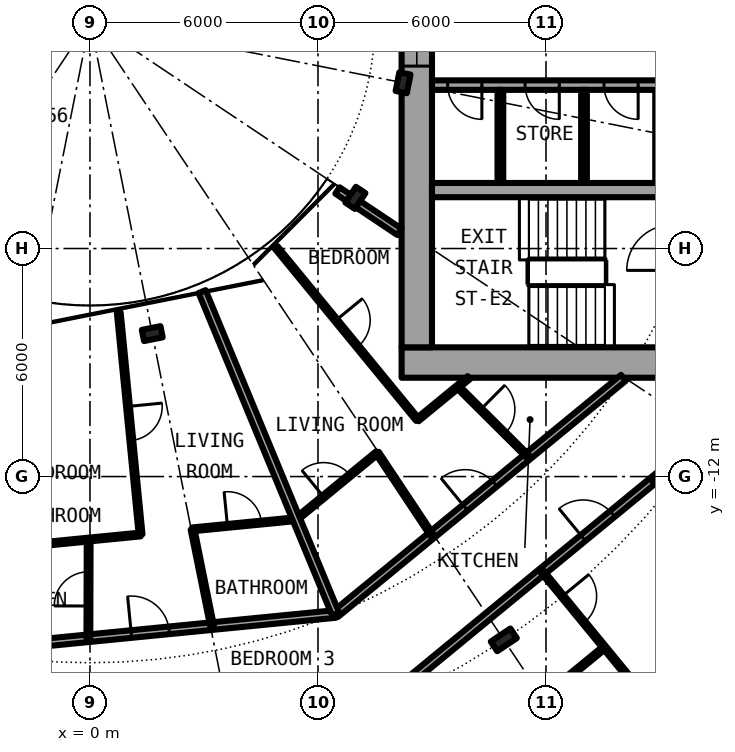
"""IFC4 building model, lengths in metres.
Left out: names, types, materials, properties, quantities, classifications, styles, units other than length and angle.
Written with IfcOpenShell. Run it as: python <this file> out.ifc"""

import sys

from ifc_helpers import new_model, si_unit, direction, frame, frame_2d, origin, origin_2d, place, context, subcontext, project, spatial, rectangle, i_section, extrude, element, fill, save


model = new_model("IFC4")
c1 = context("Model", 3, precision=1e-05, world=origin(), true_north=direction((0.0, 1.0)))
c2 = subcontext(c1, "Body", "Model", "MODEL_VIEW")
j1 = project(units=[si_unit("LENGTHUNIT", "METRE"), si_unit("PLANEANGLEUNIT", "RADIAN")], contexts=[c1])
p1 = place(None, origin())
s1 = spatial("IfcSite", under=j1, at=p1, CompositionType="ELEMENT")
p2 = place(p1, origin())
s2 = spatial("IfcBuilding", under=s1, at=p2, CompositionType="ELEMENT")
p3 = place(p2, frame((0.0, 0.0, 35.0)))
s3 = spatial("IfcBuildingStorey", under=s2, at=p3, CompositionType="ELEMENT", Elevation=35.0)
p4 = place(p3, frame((10.889, -16.297, 0.0), z_axis=(0.0, 0.0, 1.0), x_axis=(0.55557023302, -0.831469612303, 0.0)))
e1 = element("IfcColumn", 1, at=p4, inside=s3, PredefinedType="COLUMN", context=c2, shape_type="SweptSolid", body=[
    extrude(i_section(OverallWidth=0.305, OverallDepth=0.62, WebThickness=0.021, FlangeThickness=0.04, FilletRadius=0.027, at=origin_2d()), origin(), (0.0, 0.0, 1.0), 3.05),
])
for number, where, z_axis, x_axis in (
    (2, (1.639, -8.239, 0.0), (0.0, 0.0, 1.0), (0.195, -0.981, 0.0)),
    (3, (6.984, -4.667, 0.0), (0.0, 0.0, 1.0), (0.831, -0.556, 0.0)),
    (4, (8.239, -1.639, 0.0), (0.0, 0.0, 1.0), (0.981, -0.195, 0.0)),
):
    element("IfcColumn", number, at=place(p3, frame(where, z_axis=z_axis, x_axis=x_axis)), inside=s3, PredefinedType="COLUMN", context=c2, shape_type="SweptSolid", body=[
        extrude(i_section(OverallWidth=0.3, OverallDepth=0.5, WebThickness=0.014, FlangeThickness=0.028, FilletRadius=0.027, at=origin_2d()), origin(), (0.0, 0.0, 1.0), 3.05),
    ])
p5 = place(p3, frame((8.2, -9.0, 0.0), z_axis=(0.0, 0.0, 1.0), x_axis=(1.0, 0.0, 0.0)))
e5 = element("IfcWall", 5, at=p5, inside=s3, PredefinedType="SHEAR", context=c2, shape_type="SweptSolid", body=[
    extrude(rectangle(XDim=14.2, YDim=0.8, at=frame_2d((7.1, 0.0))), origin(), (0.0, 0.0, 1.0), 3.05),
])
p6 = place(p5, frame((11.675, 0.0, 0.0)))
e6 = element("IfcOpeningElement", 6, at=p6, cuts=e5, PredefinedType="OPENING", context=c2, shape_type="SweptSolid", body=[
    extrude(rectangle(XDim=1.2, YDim=2.3, at=frame_2d((0.6, 1.15))), frame((0.0, 0.41, 0.0), z_axis=(0.0, -1.0, 0.0), x_axis=(1.0, 0.0, 0.0)), (0.0, 0.0, 1.0), 0.82),
])
p7 = place(p3, frame((8.6, -8.6, 0.0), z_axis=(0.0, 0.0, 1.0), x_axis=(0.0, 1.0, 0.0)))
e7 = element("IfcWall", 7, at=p7, inside=s3, PredefinedType="SHEAR", context=c2, shape_type="SweptSolid", body=[
    extrude(rectangle(XDim=17.2, YDim=0.8, at=frame_2d((8.6, 0.0))), origin(), (0.0, 0.0, 1.0), 3.05),
])
p8 = place(p7, frame((7.4, 0.0, 0.1)))
e8 = element("IfcOpeningElement", 8, at=p8, cuts=e7, PredefinedType="OPENING", context=c2, shape_type="SweptSolid", body=[
    extrude(rectangle(XDim=2.4, YDim=2.2, at=frame_2d((1.2, 1.1))), frame((0.0, 0.41, 0.0), z_axis=(0.0, -1.0, 0.0), x_axis=(1.0, 0.0, 0.0)), (0.0, 0.0, 1.0), 0.82),
])
p9 = place(p3, frame((19.15, -1.7, 0.0), z_axis=(0.0, 0.0, 1.0), x_axis=(-1.0, 0.0, 0.0)))
e9 = element("IfcWall", 9, at=p9, inside=s3, PredefinedType="SHEAR", context=c2, shape_type="SweptSolid", body=[
    extrude(rectangle(XDim=10.15, YDim=0.25, at=frame_2d((5.075, 0.0))), origin(), (0.0, 0.0, 1.0), 3.05),
])
p10 = place(p9, frame((2.45, 0.0, 0.0)))
e10 = element("IfcOpeningElement", 10, at=p10, cuts=e9, PredefinedType="OPENING", context=c2, shape_type="SweptSolid", body=[
    extrude(rectangle(XDim=1.1, YDim=2.3, at=frame_2d((0.55, 1.15))), frame((0.0, 0.135, 0.0), z_axis=(0.0, -1.0, 0.0), x_axis=(1.0, 0.0, 0.0)), (0.0, 0.0, 1.0), 0.27),
])
p11 = place(p9, frame((8.837, 0.0, 0.0)))
e11 = element("IfcOpeningElement", 11, at=p11, cuts=e9, PredefinedType="OPENING", context=c2, shape_type="SweptSolid", body=[
    extrude(rectangle(XDim=0.9, YDim=2.3, at=frame_2d((0.45, 1.15))), frame((0.0, 0.135, 0.0), z_axis=(0.0, -1.0, 0.0), x_axis=(1.0, 0.0, 0.0)), (0.0, 0.0, 1.0), 0.27),
])
p12 = place(p9, frame((6.8, 0.0, 0.0)))
e12 = element("IfcOpeningElement", 12, at=p12, cuts=e9, PredefinedType="OPENING", context=c2, shape_type="SweptSolid", body=[
    extrude(rectangle(XDim=0.9, YDim=2.3, at=frame_2d((0.45, 1.15))), frame((0.0, 0.135, 0.0), z_axis=(0.0, -1.0, 0.0), x_axis=(1.0, 0.0, 0.0)), (0.0, 0.0, 1.0), 0.27),
])
p13 = place(p9, frame((4.725, 0.0, 0.0)))
e13 = element("IfcOpeningElement", 13, at=p13, cuts=e9, PredefinedType="OPENING", context=c2, shape_type="SweptSolid", body=[
    extrude(rectangle(XDim=0.9, YDim=2.3, at=frame_2d((0.45, 1.15))), frame((0.0, 0.135, 0.0), z_axis=(0.0, -1.0, 0.0), x_axis=(1.0, 0.0, 0.0)), (0.0, 0.0, 1.0), 0.27),
])
p14 = place(p9, frame((0.413, 0.0, 0.0)))
e14 = element("IfcOpeningElement", 14, at=p14, cuts=e9, PredefinedType="OPENING", context=c2, shape_type="SweptSolid", body=[
    extrude(rectangle(XDim=0.9, YDim=2.3, at=frame_2d((0.45, 1.15))), frame((0.0, 0.135, 0.0), z_axis=(0.0, -1.0, 0.0), x_axis=(1.0, 0.0, 0.0)), (0.0, 0.0, 1.0), 0.27),
])
p15 = place(p3, frame((9.0, -4.462, 0.0), z_axis=(0.0, 0.0, 1.0), x_axis=(1.0, 0.0, 0.0)))
e15 = element("IfcWall", 15, at=p15, inside=s3, PredefinedType="SHEAR", context=c2, shape_type="SweptSolid", body=[
    extrude(rectangle(XDim=10.15, YDim=0.375, at=frame_2d((5.075, 0.0))), origin(), (0.0, 0.0, 1.0), 3.05),
])
p16 = place(p3, frame((15.0, -1.825, 0.0), z_axis=(0.0, 0.0, 1.0), x_axis=(0.0, -1.0, 0.0)))
e16 = element("IfcWall", 16, at=p16, inside=s3, PredefinedType="SOLIDWALL", context=c2, shape_type="SweptSolid", body=[
    extrude(rectangle(XDim=2.45, YDim=0.25, at=frame_2d((1.225, 0.0))), origin(), (0.0, 0.0, 1.0), 2.7),
])
for number, where, z_axis, x_axis in (
    (17, (10.8, -1.825, 0.0), (0.0, 0.0, 1.0), (0.0, -1.0, 0.0)),
    (18, (13.0, -1.825, 0.0), (0.0, 0.0, 1.0), (0.0, -1.0, 0.0)),
):
    element("IfcWall", number, at=place(p3, frame(where, z_axis=z_axis, x_axis=x_axis)), inside=s3, PredefinedType="PARTITIONING", context=c2, shape_type="SweptSolid", body=[
        extrude(rectangle(XDim=2.45, YDim=0.15, at=frame_2d((1.225, 0.0))), origin(), (0.0, 0.0, 1.0), 2.7),
    ])
p17 = place(p3, frame((8.534, -20.603, 0.0), z_axis=(0.0, 0.0, 1.0), x_axis=(0.773000340237, 0.634405606843, 0.0)))
e19 = element("IfcWall", 19, at=p17, inside=s3, PredefinedType="PARTITIONING", context=c2, shape_type="SweptSolid", body=[
    extrude(rectangle(XDim=6.474, YDim=0.1, at=frame_2d((3.237, 0.0))), origin(), (0.0, 0.0, 1.0), 2.7),
])
p18 = place(p3, frame((7.512, -18.105, 0.0), z_axis=(0.0, 0.0, 1.0), x_axis=(0.772704887747, 0.634765434198, 0.0)))
e20 = element("IfcWall", 20, at=p18, inside=s3, PredefinedType="PARTITIONING", context=c2, shape_type="SweptSolid", body=[
    extrude(rectangle(XDim=11.209, YDim=0.2, at=frame_2d((5.604, 0.0))), origin(), (0.0, 0.0, 1.0), 2.38),
])
p19 = place(p18, frame((7.072, 0.0, 0.0)))
e21 = element("IfcOpeningElement", 21, at=p19, cuts=e20, PredefinedType="OPENING", context=c2, shape_type="SweptSolid", body=[
    extrude(rectangle(XDim=1.0, YDim=2.3, at=frame_2d((0.5, 1.15))), frame((0.0, 0.11, 0.0), z_axis=(0.0, -1.0, 0.0), x_axis=(1.0, 0.0, 0.0)), (0.0, 0.0, 1.0), 0.22),
])
p20 = place(p3, frame((-3.297, -16.575, 0.0), z_axis=(0.0, 0.0, 1.0), x_axis=(0.995201860711, 0.097843019361, 0.0)))
e22 = element("IfcWall", 22, at=p20, inside=s3, PredefinedType="PARTITIONING", context=c2, shape_type="SweptSolid", body=[
    extrude(rectangle(XDim=9.811, YDim=0.2, at=frame_2d((4.906, 0.0))), origin(), (0.0, 0.0, 1.0), 2.7),
])
p21 = place(p20, frame((4.406, 0.0, 0.0)))
e23 = element("IfcOpeningElement", 23, at=p21, cuts=e22, PredefinedType="OPENING", context=c2, shape_type="SweptSolid", body=[
    extrude(rectangle(XDim=1.0, YDim=2.3, at=frame_2d((0.5, 1.15))), frame((0.0, 0.11, 0.0), z_axis=(0.0, -1.0, 0.0), x_axis=(1.0, 0.0, 0.0)), (0.0, 0.0, 1.0), 0.22),
])
p22 = place(p3, frame((6.467, -15.614, 0.0), z_axis=(0.0, 0.0, 1.0), x_axis=(0.773084654695, 0.634302858794, 0.0)))
e24 = element("IfcWall", 24, at=p22, inside=s3, PredefinedType="PARTITIONING", context=c2, shape_type="SweptSolid", body=[
    extrude(rectangle(XDim=9.793, YDim=0.2, at=frame_2d((4.896, 0.0))), origin(), (0.0, 0.0, 1.0), 2.7),
])
p23 = place(p22, frame((4.407, 0.0, 0.0)))
e25 = element("IfcOpeningElement", 25, at=p23, cuts=e24, PredefinedType="OPENING", context=c2, shape_type="SweptSolid", body=[
    extrude(rectangle(XDim=1.0, YDim=2.3, at=frame_2d((0.5, 1.15))), frame((0.0, 0.11, 0.0), z_axis=(0.0, -1.0, 0.0), x_axis=(1.0, 0.0, 0.0)), (0.0, 0.0, 1.0), 0.22),
])
p24 = place(p3, frame((-2.772, -13.927, 0.0), z_axis=(0.0, 0.0, 1.0), x_axis=(0.995206960104, 0.097791137432, 0.0)))
e26 = element("IfcWall", 26, at=p24, inside=s3, PredefinedType="PARTITIONING", context=c2, shape_type="SweptSolid", body=[
    extrude(rectangle(XDim=4.122, YDim=0.1, at=frame_2d((2.061, 0.0))), origin(), (0.0, 0.0, 1.0), 2.7),
])
p25 = place(p3, frame((2.696, -13.389, 0.0), z_axis=(0.0, 0.0, 1.0), x_axis=(0.995215675266, 0.097702403787, 0.0)))
e27 = element("IfcWall", 27, at=p25, inside=s3, PredefinedType="PARTITIONING", context=c2, shape_type="SweptSolid", body=[
    extrude(rectangle(XDim=2.751, YDim=0.1, at=frame_2d((1.375, 0.0))), origin(), (0.0, 0.0, 1.0), 2.7),
])
p26 = place(p25, frame((0.926, 0.0, 0.0)))
e28 = element("IfcOpeningElement", 28, at=p26, cuts=e27, PredefinedType="OPENING", context=c2, shape_type="SweptSolid", body=[
    extrude(rectangle(XDim=0.9, YDim=2.3, at=frame_2d((0.45, 1.15))), frame((0.0, 0.06, 0.0), z_axis=(0.0, -1.0, 0.0), x_axis=(1.0, 0.0, 0.0)), (0.0, 0.0, 1.0), 0.12),
])
p27 = place(p3, frame((5.434, -13.119, 0.0), z_axis=(0.0, 0.0, 1.0), x_axis=(0.773049907698, 0.634345205868, 0.0)))
e29 = element("IfcWall", 29, at=p27, inside=s3, PredefinedType="PARTITIONING", context=c2, shape_type="SweptSolid", body=[
    extrude(rectangle(XDim=2.748, YDim=0.1, at=frame_2d((1.374, 0.0))), origin(), (0.0, 0.0, 1.0), 2.7),
])
p28 = place(p27, frame((0.924, 0.0, 0.0)))
e30 = element("IfcOpeningElement", 30, at=p28, cuts=e29, PredefinedType="OPENING", context=c2, shape_type="SweptSolid", body=[
    extrude(rectangle(XDim=0.9, YDim=2.3, at=frame_2d((0.45, 1.15))), frame((0.0, 0.06, 0.0), z_axis=(0.0, -1.0, 0.0), x_axis=(1.0, 0.0, 0.0)), (0.0, 0.0, 1.0), 0.12),
])
p29 = place(p3, frame((8.619, -10.505, 0.0), z_axis=(0.0, 0.0, 1.0), x_axis=(0.77321028337, 0.634149712363, 0.0)))
e31 = element("IfcWall", 31, at=p29, inside=s3, PredefinedType="PARTITIONING", context=c2, shape_type="SweptSolid", body=[
    extrude(rectangle(XDim=1.749, YDim=0.1, at=frame_2d((0.874, 0.0))), origin(), (0.0, 0.0, 1.0), 2.7),
])
p30 = place(p3, frame((6.513, -4.472, 0.0), z_axis=(0.0, 0.0, 1.0), x_axis=(0.831417956244, -0.555647533996, 0.0)))
e32 = element("IfcWall", 32, at=p30, inside=s3, PredefinedType="PARTITIONING", context=c2, shape_type="SweptSolid", body=[
    extrude(rectangle(XDim=1.962, YDim=0.2, at=frame_2d((0.981, 0.0))), origin(), (0.0, 0.0, 1.0), 2.7),
])
p31 = place(p3, frame((-0.042, -16.255, 0.0), z_axis=(0.0, 0.0, 1.0), x_axis=(0.00272632248, 0.999996283576, 0.0)))
e33 = element("IfcWall", 33, at=p31, inside=s3, PredefinedType="PARTITIONING", context=c2, shape_type="SweptSolid", body=[
    extrude(rectangle(XDim=2.597, YDim=0.1, at=frame_2d((1.298, 0.0))), origin(), (0.0, 0.0, 1.0), 2.7),
])
p32 = place(p31, frame((0.849, 0.0, 0.0)))
e34 = element("IfcOpeningElement", 34, at=p32, cuts=e33, PredefinedType="OPENING", context=c2, shape_type="SweptSolid", body=[
    extrude(rectangle(XDim=0.9, YDim=2.3, at=frame_2d((0.45, 1.15))), frame((0.0, 0.06, 0.0), z_axis=(0.0, -1.0, 0.0), x_axis=(1.0, 0.0, 0.0)), (0.0, 0.0, 1.0), 0.12),
])
p33 = place(p3, frame((0.757, -7.683, 0.0), z_axis=(0.0, 0.0, 1.0), x_axis=(0.097979463572, -0.995188436789, 0.0)))
e35 = element("IfcWall", 35, at=p33, inside=s3, PredefinedType="PARTITIONING", context=c2, shape_type="SweptSolid", body=[
    extrude(rectangle(XDim=5.868, YDim=0.1, at=frame_2d((2.934, 0.0))), origin(), (0.0, 0.0, 1.0), 2.7),
])
p34 = place(p33, frame((2.484, 0.0, 0.0)))
e36 = element("IfcOpeningElement", 36, at=p34, cuts=e35, PredefinedType="OPENING", context=c2, shape_type="SweptSolid", body=[
    extrude(rectangle(XDim=0.9, YDim=2.3, at=frame_2d((0.45, 1.15))), frame((0.0, 0.06, 0.0), z_axis=(0.0, -1.0, 0.0), x_axis=(1.0, 0.0, 0.0)), (0.0, 0.0, 1.0), 0.12),
])
p35 = place(p3, frame((2.699, -13.389, 0.0), z_axis=(0.0, 0.0, 1.0), x_axis=(0.197923987231, -0.980217371443, 0.0)))
e37 = element("IfcWall", 37, at=p35, inside=s3, PredefinedType="PARTITIONING", context=c2, shape_type="SweptSolid", body=[
    extrude(rectangle(XDim=2.596, YDim=0.1, at=frame_2d((1.298, 0.0))), origin(), (0.0, 0.0, 1.0), 2.7),
])
p36 = place(p3, frame((2.951, -7.133, 0.0), z_axis=(0.0, 0.0, 1.0), x_axis=(0.382518543471, -0.92394781449, 0.0)))
e38 = element("IfcWall", 38, at=p36, inside=s3, PredefinedType="PARTITIONING", context=c2, shape_type="SweptSolid", body=[
    extrude(rectangle(XDim=9.181, YDim=0.2, at=frame_2d((4.591, 0.0))), origin(), (0.0, 0.0, 1.0), 2.7),
])
p37 = place(p3, frame((4.897, -5.969, 0.0), z_axis=(0.0, 0.0, 1.0), x_axis=(0.634539754242, -0.772890225249, 0.0)))
e39 = element("IfcWall", 39, at=p37, inside=s3, PredefinedType="PARTITIONING", context=c2, shape_type="SweptSolid", body=[
    extrude(rectangle(XDim=5.867, YDim=0.1, at=frame_2d((2.934, 0.0))), origin(), (0.0, 0.0, 1.0), 2.7),
])
p38 = place(p37, frame((2.484, 0.0, 0.0)))
e40 = element("IfcOpeningElement", 40, at=p38, cuts=e39, PredefinedType="OPENING", context=c2, shape_type="SweptSolid", body=[
    extrude(rectangle(XDim=0.9, YDim=2.3, at=frame_2d((0.45, 1.15))), frame((0.0, 0.06, 0.0), z_axis=(0.0, -1.0, 0.0), x_axis=(1.0, 0.0, 0.0)), (0.0, 0.0, 1.0), 0.12),
])
p39 = place(p3, frame((7.558, -11.376, 0.0), z_axis=(0.0, 0.0, 1.0), x_axis=(0.553615197403, -0.83277260594, 0.0)))
e41 = element("IfcWall", 41, at=p39, inside=s3, PredefinedType="PARTITIONING", context=c2, shape_type="SweptSolid", body=[
    extrude(rectangle(XDim=2.597, YDim=0.1, at=frame_2d((1.299, 0.0))), origin(), (0.0, 0.0, 1.0), 2.7),
])
p40 = place(p3, frame((9.679, -9.636, 0.0), z_axis=(0.0, 0.0, 1.0), x_axis=(0.708843617398, -0.705365668341, 0.0)))
e42 = element("IfcWall", 42, at=p40, inside=s3, PredefinedType="PARTITIONING", context=c2, shape_type="SweptSolid", body=[
    extrude(rectangle(XDim=2.597, YDim=0.1, at=frame_2d((1.299, 0.0))), origin(), (0.0, 0.0, 1.0), 2.7),
])
p41 = place(p40, frame((0.849, 0.0, 0.0)))
e43 = element("IfcOpeningElement", 43, at=p41, cuts=e42, PredefinedType="OPENING", context=c2, shape_type="SweptSolid", body=[
    extrude(rectangle(XDim=0.9, YDim=2.3, at=frame_2d((0.45, 1.15))), frame((0.0, 0.06, 0.0), z_axis=(0.0, -1.0, 0.0), x_axis=(1.0, 0.0, 0.0)), (0.0, 0.0, 1.0), 0.12),
])
p42 = place(p3, frame((11.899, -14.499, 0.0), z_axis=(0.0, 0.0, 1.0), x_axis=(0.634396151441, -0.77300810024, 0.0)))
e44 = element("IfcWall", 44, at=p42, inside=s3, PredefinedType="PARTITIONING", context=c2, shape_type="SweptSolid", body=[
    extrude(rectangle(XDim=8.419, YDim=0.1, at=frame_2d((4.209, 0.0))), origin(), (0.0, 0.0, 1.0), 2.7),
])
p43 = place(p42, frame((0.84, 0.0, 0.0)))
e45 = element("IfcOpeningElement", 45, at=p43, cuts=e44, PredefinedType="OPENING", context=c2, shape_type="SweptSolid", body=[
    extrude(rectangle(XDim=0.9, YDim=2.3, at=frame_2d((0.45, 1.15))), frame((0.0, 0.06, 0.0), z_axis=(0.0, -1.0, 0.0), x_axis=(1.0, 0.0, 0.0)), (0.0, 0.0, 1.0), 0.12),
])
p44 = place(p42, frame((5.051, 0.0, 0.0)))
e46 = element("IfcOpeningElement", 46, at=p44, cuts=e44, PredefinedType="OPENING", context=c2, shape_type="SweptSolid", body=[
    extrude(rectangle(XDim=0.9, YDim=2.3, at=frame_2d((0.45, 1.15))), frame((0.0, 0.06, 0.0), z_axis=(0.0, -1.0, 0.0), x_axis=(1.0, 0.0, 0.0)), (0.0, 0.0, 1.0), 0.12),
])
p45 = place(p3, frame((14.831, -12.092, 0.0), z_axis=(0.0, 0.0, 1.0), x_axis=(0.774979608522, -0.631986239072, 0.0)))
e47 = element("IfcWall", 47, at=p45, inside=s3, PredefinedType="PARTITIONING", context=c2, shape_type="SweptSolid", body=[
    extrude(rectangle(XDim=2.636, YDim=0.1, at=frame_2d((1.318, 0.0))), origin(), (0.0, 0.0, 1.0), 2.7),
])
p46 = place(p45, frame((0.868, 0.0, 0.0)))
e48 = element("IfcOpeningElement", 48, at=p46, cuts=e47, PredefinedType="OPENING", context=c2, shape_type="SweptSolid", body=[
    extrude(rectangle(XDim=0.9, YDim=2.3, at=frame_2d((0.45, 1.15))), frame((0.0, 0.06, 0.0), z_axis=(0.0, -1.0, 0.0), x_axis=(1.0, 0.0, 0.0)), (0.0, 0.0, 1.0), 0.12),
])
p47 = place(p11, origin())
e49 = element("IfcDoor", 49, at=p47, inside=s3, OperationType="SINGLE_SWING_LEFT", PredefinedType="DOOR", context=c2, shape_type="SweptSolid", body=[
    extrude(rectangle(XDim=0.9, YDim=2.3, at=frame_2d((0.45, 1.15))), frame((0.0, 0.025, 0.0), z_axis=(0.0, -1.0, 0.0), x_axis=(1.0, 0.0, 0.0)), (0.0, 0.0, 1.0), 0.05),
])
fill(e11, e49)
p48 = place(p12, origin())
e50 = element("IfcDoor", 50, at=p48, inside=s3, OperationType="SINGLE_SWING_LEFT", PredefinedType="DOOR", context=c2, shape_type="SweptSolid", body=[
    extrude(rectangle(XDim=0.9, YDim=2.3, at=frame_2d((0.45, 1.15))), frame((0.0, 0.025, 0.0), z_axis=(0.0, -1.0, 0.0), x_axis=(1.0, 0.0, 0.0)), (0.0, 0.0, 1.0), 0.05),
])
fill(e12, e50)
p49 = place(p13, origin())
e51 = element("IfcDoor", 51, at=p49, inside=s3, OperationType="SINGLE_SWING_LEFT", PredefinedType="DOOR", context=c2, shape_type="SweptSolid", body=[
    extrude(rectangle(XDim=0.9, YDim=2.3, at=frame_2d((0.45, 1.15))), frame((0.0, 0.025, 0.0), z_axis=(0.0, -1.0, 0.0), x_axis=(1.0, 0.0, 0.0)), (0.0, 0.0, 1.0), 0.05),
])
fill(e13, e51)
p50 = place(p8, origin())
e52 = element("IfcWindow", 52, at=p50, inside=s3, PartitioningType="SINGLE_PANEL", PredefinedType="WINDOW", context=c2, shape_type="SweptSolid", body=[
    extrude(rectangle(XDim=2.4, YDim=2.2, at=frame_2d((1.2, 1.1))), frame((0.0, 0.03, 0.0), z_axis=(0.0, -1.0, 0.0), x_axis=(1.0, 0.0, 0.0)), (0.0, 0.0, 1.0), 0.06),
])
fill(e8, e52)
p51 = place(p19, origin())
e53 = element("IfcDoor", 53, at=p51, inside=s3, OperationType="SINGLE_SWING_RIGHT", PredefinedType="DOOR", context=c2, shape_type="SweptSolid", body=[
    extrude(rectangle(XDim=1.0, YDim=2.3, at=frame_2d((0.5, 1.15))), frame((0.0, 0.025, 0.0), z_axis=(0.0, -1.0, 0.0), x_axis=(1.0, 0.0, 0.0)), (0.0, 0.0, 1.0), 0.05),
])
fill(e21, e53)
p52 = place(p43, origin())
e54 = element("IfcDoor", 54, at=p52, inside=s3, OperationType="SINGLE_SWING_LEFT", PredefinedType="DOOR", context=c2, shape_type="SweptSolid", body=[
    extrude(rectangle(XDim=0.9, YDim=2.3, at=frame_2d((0.45, 1.15))), frame((0.0, 0.025, 0.0), z_axis=(0.0, -1.0, 0.0), x_axis=(1.0, 0.0, 0.0)), (0.0, 0.0, 1.0), 0.05),
])
fill(e45, e54)
p53 = place(p21, origin())
e55 = element("IfcDoor", 55, at=p53, inside=s3, OperationType="SINGLE_SWING_RIGHT", PredefinedType="DOOR", context=c2, shape_type="SweptSolid", body=[
    extrude(rectangle(XDim=1.0, YDim=2.3, at=frame_2d((0.5, 1.15))), frame((0.0, 0.025, 0.0), z_axis=(0.0, -1.0, 0.0), x_axis=(1.0, 0.0, 0.0)), (0.0, 0.0, 1.0), 0.05),
])
fill(e23, e55)
p54 = place(p26, origin())
e56 = element("IfcDoor", 56, at=p54, inside=s3, OperationType="SINGLE_SWING_RIGHT", PredefinedType="DOOR", context=c2, shape_type="SweptSolid", body=[
    extrude(rectangle(XDim=0.9, YDim=2.3, at=frame_2d((0.45, 1.15))), frame((0.0, 0.025, 0.0), z_axis=(0.0, -1.0, 0.0), x_axis=(1.0, 0.0, 0.0)), (0.0, 0.0, 1.0), 0.05),
])
fill(e28, e56)
p55 = place(p32, origin())
e57 = element("IfcDoor", 57, at=p55, inside=s3, OperationType="SINGLE_SWING_RIGHT", PredefinedType="DOOR", context=c2, shape_type="SweptSolid", body=[
    extrude(rectangle(XDim=0.9, YDim=2.3, at=frame_2d((0.45, 1.15))), frame((0.0, 0.025, 0.0), z_axis=(0.0, -1.0, 0.0), x_axis=(1.0, 0.0, 0.0)), (0.0, 0.0, 1.0), 0.05),
])
fill(e34, e57)
p56 = place(p34, origin())
e58 = element("IfcDoor", 58, at=p56, inside=s3, OperationType="SINGLE_SWING_RIGHT", PredefinedType="DOOR", context=c2, shape_type="SweptSolid", body=[
    extrude(rectangle(XDim=0.9, YDim=2.3, at=frame_2d((0.45, 1.15))), frame((0.0, 0.025, 0.0), z_axis=(0.0, -1.0, 0.0), x_axis=(1.0, 0.0, 0.0)), (0.0, 0.0, 1.0), 0.05),
])
fill(e36, e58)
p57 = place(p23, origin())
e59 = element("IfcDoor", 59, at=p57, inside=s3, OperationType="SINGLE_SWING_RIGHT", PredefinedType="DOOR", context=c2, shape_type="SweptSolid", body=[
    extrude(rectangle(XDim=1.0, YDim=2.3, at=frame_2d((0.5, 1.15))), frame((0.0, 0.025, 0.0), z_axis=(0.0, -1.0, 0.0), x_axis=(1.0, 0.0, 0.0)), (0.0, 0.0, 1.0), 0.05),
])
fill(e25, e59)
p58 = place(p28, origin())
e60 = element("IfcDoor", 60, at=p58, inside=s3, OperationType="SINGLE_SWING_RIGHT", PredefinedType="DOOR", context=c2, shape_type="SweptSolid", body=[
    extrude(rectangle(XDim=0.9, YDim=2.3, at=frame_2d((0.45, 1.15))), frame((0.0, 0.025, 0.0), z_axis=(0.0, -1.0, 0.0), x_axis=(1.0, 0.0, 0.0)), (0.0, 0.0, 1.0), 0.05),
])
fill(e30, e60)
p59 = place(p41, origin())
e61 = element("IfcDoor", 61, at=p59, inside=s3, OperationType="SINGLE_SWING_RIGHT", PredefinedType="DOOR", context=c2, shape_type="SweptSolid", body=[
    extrude(rectangle(XDim=0.9, YDim=2.3, at=frame_2d((0.45, 1.15))), frame((0.0, 0.025, 0.0), z_axis=(0.0, -1.0, 0.0), x_axis=(1.0, 0.0, 0.0)), (0.0, 0.0, 1.0), 0.05),
])
fill(e43, e61)
p60 = place(p38, origin())
e62 = element("IfcDoor", 62, at=p60, inside=s3, OperationType="SINGLE_SWING_LEFT", PredefinedType="DOOR", context=c2, shape_type="SweptSolid", body=[
    extrude(rectangle(XDim=0.9, YDim=2.3, at=frame_2d((0.45, 1.15))), frame((0.0, 0.025, 0.0), z_axis=(0.0, -1.0, 0.0), x_axis=(1.0, 0.0, 0.0)), (0.0, 0.0, 1.0), 0.05),
])
fill(e40, e62)
save(model, sys.argv[1])
